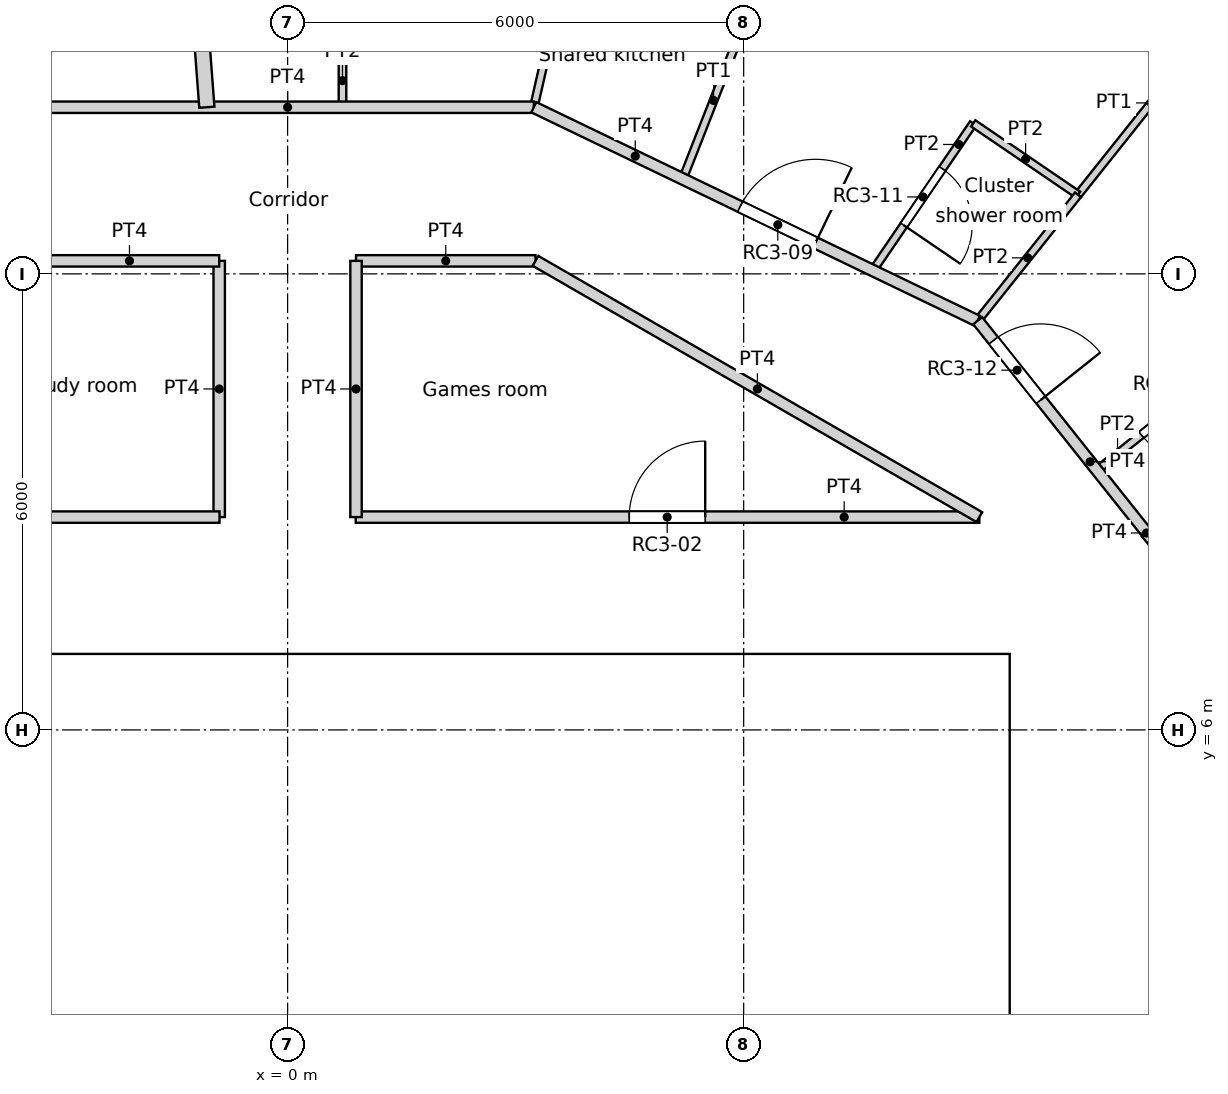
"""IFC4 building model, lengths in metres.
Left out: names, types, materials, properties, quantities, classifications, styles, units other than length and angle.
Written with IfcOpenShell. Run it as: python <this file> out.ifc"""

import sys

from ifc_helpers import new_model, si_unit, direction, frame, frame_2d, origin, origin_2d, place, context, subcontext, project, spatial, rectangle, circle, extrude, element, fill, save


model = new_model("IFC4")
c1 = context("Model", 3, precision=1e-05, world=origin(), true_north=direction((0.0, 1.0)))
c2 = subcontext(c1, "Body", "Model", "MODEL_VIEW")
j1 = project(units=[si_unit("LENGTHUNIT", "METRE"), si_unit("PLANEANGLEUNIT", "RADIAN")], contexts=[c1])
p1 = place(None, origin())
s1 = spatial("IfcSite", under=j1, at=p1, CompositionType="ELEMENT")
p2 = place(p1, origin())
s2 = spatial("IfcBuilding", under=s1, at=p2, CompositionType="ELEMENT")
p3 = place(p2, frame((0.0, 0.0, 252.6)))
s3 = spatial("IfcBuildingStorey", under=s2, at=p3, CompositionType="ELEMENT", Elevation=252.6)
p4 = place(p3, frame((11.735, 14.716, 0.0), z_axis=(0.0, 0.0, 1.0), x_axis=(1.0, 0.0, 0.0)))
e1 = element("IfcColumn", 1, at=p4, inside=s3, PredefinedType="COLUMN", context=c2, shape_type="SweptSolid", body=[
    extrude(circle(Radius=0.55, at=origin_2d()), origin(), (0.0, 0.0, 1.0), 3.6),
])
p5 = place(p3, frame((-9.5, 6.7, 0.0), z_axis=(0.0, 0.0, 1.0), x_axis=(1.0, 0.0, 0.0)))
e2 = element("IfcWall", 2, at=p5, inside=s3, PredefinedType="SOLIDWALL", context=c2, shape_type="SweptSolid", body=[
    extrude(rectangle(XDim=19.0, YDim=0.6, at=frame_2d((9.5, 0.0))), origin(), (0.0, 0.0, 1.0), 3.6),
])
p6 = place(p5, frame((5.35, 0.0, 0.0)))
e3 = element("IfcOpeningElement", 3, at=p6, cuts=e2, PredefinedType="OPENING", context=c2, shape_type="SweptSolid", body=[
    extrude(rectangle(XDim=1.7, YDim=2.1, at=frame_2d((0.85, 1.05))), frame((0.0, 0.3, 0.0), z_axis=(0.0, -1.0, 0.0), x_axis=(1.0, 0.0, 0.0)), (0.0, 0.0, 1.0), 0.6),
])
p7 = place(p3, frame((9.2, -6.4, 0.0), z_axis=(0.0, 0.0, 1.0), x_axis=(0.0, 1.0, 0.0)))
e4 = element("IfcWall", 4, at=p7, inside=s3, PredefinedType="SOLIDWALL", context=c2, shape_type="SweptSolid", body=[
    extrude(rectangle(XDim=12.8, YDim=0.6, at=frame_2d((6.4, 0.0))), origin(), (0.0, 0.0, 1.0), 3.6),
])
p8 = place(p7, frame((6.4, 0.0, 0.0)))
e5 = element("IfcOpeningElement", 5, at=p8, cuts=e4, PredefinedType="OPENING", context=c2, shape_type="SweptSolid", body=[
    extrude(rectangle(XDim=1.8, YDim=2.1, at=frame_2d((0.9, 1.05))), frame((0.0, 0.3, 0.0), z_axis=(0.0, -1.0, 0.0), x_axis=(1.0, 0.0, 0.0)), (0.0, 0.0, 1.0), 0.6),
])
p9 = place(p3, frame((-4.35, 3.1, 0.0), z_axis=(0.0, 0.0, 1.0), x_axis=(1.0, 0.0, 0.0)))
e6 = element("IfcWall", 6, at=p9, inside=s3, PredefinedType="SOLIDWALL", context=c2, shape_type="SweptSolid", body=[
    extrude(rectangle(XDim=13.25, YDim=0.3, at=frame_2d((6.625, 0.0))), origin(), (0.0, 0.0, 1.0), 3.25),
])
p10 = place(p9, frame((2.95, 0.0, 0.0)))
e7 = element("IfcOpeningElement", 7, at=p10, cuts=e6, PredefinedType="OPENING", context=c2, shape_type="SweptSolid", body=[
    extrude(rectangle(XDim=1.1, YDim=2.1, at=frame_2d((0.55, 1.05))), frame((0.0, 0.15, 0.0), z_axis=(0.0, -1.0, 0.0), x_axis=(1.0, 0.0, 0.0)), (0.0, 0.0, 1.0), 0.3),
])
p11 = place(p9, frame((5.75, 0.0, 0.0)))
e8 = element("IfcOpeningElement", 8, at=p11, cuts=e6, PredefinedType="OPENING", context=c2, shape_type="SweptSolid", body=[
    extrude(rectangle(XDim=1.1, YDim=2.1, at=frame_2d((0.55, 1.05))), frame((0.0, 0.15, 0.0), z_axis=(0.0, -1.0, 0.0), x_axis=(1.0, 0.0, 0.0)), (0.0, 0.0, 1.0), 0.3),
])
p12 = place(p9, frame((8.55, 0.0, 0.0)))
e9 = element("IfcOpeningElement", 9, at=p12, cuts=e6, PredefinedType="OPENING", context=c2, shape_type="SweptSolid", body=[
    extrude(rectangle(XDim=1.1, YDim=2.1, at=frame_2d((0.55, 1.05))), frame((0.0, 0.15, 0.0), z_axis=(0.0, -1.0, 0.0), x_axis=(1.0, 0.0, 0.0)), (0.0, 0.0, 1.0), 0.3),
])
p13 = place(p3, frame((-2.25, -2.95, 0.0), z_axis=(0.0, 0.0, 1.0), x_axis=(0.0, 1.0, 0.0)))
e10 = element("IfcWall", 10, at=p13, inside=s3, PredefinedType="SOLIDWALL", context=c2, shape_type="SweptSolid", body=[
    extrude(rectangle(XDim=5.9, YDim=0.15, at=frame_2d((2.95, 0.0))), origin(), (0.0, 0.0, 1.0), 3.25),
])
p14 = place(p13, frame((2.25, 0.0, 0.0)))
e11 = element("IfcOpeningElement", 11, at=p14, cuts=e10, PredefinedType="OPENING", context=c2, shape_type="SweptSolid", body=[
    extrude(rectangle(XDim=1.4, YDim=2.1, at=frame_2d((0.7, 1.05))), frame((0.0, 0.075, 0.0), z_axis=(0.0, -1.0, 0.0), x_axis=(1.0, 0.0, 0.0)), (0.0, 0.0, 1.0), 0.15),
])
for number, where, z_axis, x_axis in (
    (12, (-2.25, 3.25, 0.0), (0.0, 0.0, 1.0), (0.0, 1.0, 0.0)),
    (13, (0.55, 3.25, 0.0), (0.0, 0.0, 1.0), (0.0, 1.0, 0.0)),
    (14, (3.35, 3.25, 0.0), (0.0, 0.0, 1.0), (0.0, 1.0, 0.0)),
    (15, (6.15, 3.25, 0.0), (0.0, 0.0, 1.0), (0.0, 1.0, 0.0)),
):
    element("IfcWall", number, at=place(p3, frame(where, z_axis=z_axis, x_axis=x_axis)), inside=s3, PredefinedType="SOLIDWALL", context=c2, shape_type="SweptSolid", body=[
        extrude(rectangle(XDim=3.15, YDim=0.3, at=frame_2d((1.575, 0.0))), origin(), (0.0, 0.0, 1.0), 3.25),
    ])
p15 = place(p3, frame((-9.092, 8.8, 0.0), z_axis=(0.0, 0.0, 1.0), x_axis=(1.0, 0.0, 0.0)))
e16 = element("IfcWall", 16, at=p15, inside=s3, PredefinedType="PARTITIONING", context=c2, shape_type="SweptSolid", body=[
    extrude(rectangle(XDim=8.196, YDim=0.15, at=frame_2d((4.098, 0.0))), origin(), (0.0, 0.0, 1.0), 3.25),
])
p16 = place(p15, frame((3.598, 0.0, 0.0)))
e17 = element("IfcOpeningElement", 17, at=p16, cuts=e16, PredefinedType="OPENING", context=c2, shape_type="SweptSolid", body=[
    extrude(rectangle(XDim=1.0, YDim=2.04, at=frame_2d((0.5, 1.02))), frame((0.0, 0.075, 0.0), z_axis=(0.0, -1.0, 0.0), x_axis=(1.0, 0.0, 0.0)), (0.0, 0.0, 1.0), 0.15),
])
p17 = place(p3, frame((0.896, 8.8, 0.0), z_axis=(0.0, 0.0, 1.0), x_axis=(1.0, 0.0, 0.0)))
e18 = element("IfcWall", 18, at=p17, inside=s3, PredefinedType="PARTITIONING", context=c2, shape_type="SweptSolid", body=[
    extrude(rectangle(XDim=8.205, YDim=0.15, at=frame_2d((4.102, 0.0))), origin(), (0.0, 0.0, 1.0), 3.25),
])
p18 = place(p17, frame((3.598, 0.0, 0.0)))
e19 = element("IfcOpeningElement", 19, at=p18, cuts=e18, PredefinedType="OPENING", context=c2, shape_type="SweptSolid", body=[
    extrude(rectangle(XDim=1.0, YDim=2.04, at=frame_2d((0.5, 1.02))), frame((0.0, 0.075, 0.0), z_axis=(0.0, -1.0, 0.0), x_axis=(1.0, 0.0, 0.0)), (0.0, 0.0, 1.0), 0.15),
])
p19 = place(p3, frame((9.079, 11.384, 0.0), z_axis=(0.0, 0.0, 1.0), x_axis=(0.623165080354, -0.782090328944, 0.0)))
e20 = element("IfcWall", 20, at=p19, inside=s3, PredefinedType="PARTITIONING", context=c2, shape_type="SweptSolid", body=[
    extrude(rectangle(XDim=3.564, YDim=0.15, at=frame_2d((1.782, 0.0))), origin(), (0.0, 0.0, 1.0), 3.25),
])
p20 = place(p19, frame((0.332, 0.0, 0.0)))
e21 = element("IfcOpeningElement", 21, at=p20, cuts=e20, PredefinedType="OPENING", context=c2, shape_type="SweptSolid", body=[
    extrude(rectangle(XDim=1.0, YDim=2.1, at=frame_2d((0.5, 1.05))), frame((0.0, 0.075, 0.0), z_axis=(0.0, -1.0, 0.0), x_axis=(1.0, 0.0, 0.0)), (0.0, 0.0, 1.0), 0.15),
])
p21 = place(p3, frame((11.3, 8.586, 0.0), z_axis=(0.0, 0.0, 1.0), x_axis=(0.0, 1.0, 0.0)))
e22 = element("IfcWall", 22, at=p21, inside=s3, PredefinedType="PARTITIONING", context=c2, shape_type="SweptSolid", body=[
    extrude(rectangle(XDim=0.01, YDim=0.15, at=frame_2d((0.005, 0.0))), origin(), (0.0, 0.0, 1.0), 3.25),
])
p22 = place(p3, frame((11.3, 8.592, 0.0), z_axis=(0.0, 0.0, 1.0), x_axis=(0.623405636383, -0.781898594785, 0.0)))
e23 = element("IfcWall", 23, at=p22, inside=s3, PredefinedType="PARTITIONING", context=c2, shape_type="SweptSolid", body=[
    extrude(rectangle(XDim=0.74, YDim=0.15, at=frame_2d((0.37, 0.0))), origin(), (0.0, 0.0, 1.0), 3.25),
])
p23 = place(p3, frame((-0.9, 8.8, 0.0), z_axis=(0.0, 0.0, 1.0), x_axis=(0.0, 1.0, 0.0)))
e24 = element("IfcWall", 24, at=p23, inside=s3, PredefinedType="PARTITIONING", context=c2, shape_type="SweptSolid", body=[
    extrude(rectangle(XDim=3.371, YDim=0.15, at=frame_2d((1.686, 0.0))), origin(), (0.0, 0.0, 1.0), 3.25),
])
p24 = place(p3, frame((-3.261, 12.171, 0.0), z_axis=(0.0, 0.0, 1.0), x_axis=(1.0, 0.0, 0.0)))
e25 = element("IfcWall", 25, at=p24, inside=s3, PredefinedType="PARTITIONING", context=c2, shape_type="SweptSolid", body=[
    extrude(rectangle(XDim=2.361, YDim=0.15, at=frame_2d((1.181, 0.0))), origin(), (0.0, 0.0, 1.0), 3.25),
])
p25 = place(p3, frame((3.261, 12.171, 0.0), z_axis=(0.0, 0.0, 1.0), x_axis=(0.866066809554, -0.499928276245, 0.0)))
e26 = element("IfcWall", 26, at=p25, inside=s3, PredefinedType="PARTITIONING", context=c2, shape_type="SweptSolid", body=[
    extrude(rectangle(XDim=6.743, YDim=0.15, at=frame_2d((3.371, 0.0))), origin(), (0.0, 0.0, 1.0), 3.25),
])
p26 = place(p3, frame((0.9, 12.171, 0.0), z_axis=(0.0, 0.0, 1.0), x_axis=(1.0, 0.0, 0.0)))
e27 = element("IfcWall", 27, at=p26, inside=s3, PredefinedType="PARTITIONING", context=c2, shape_type="SweptSolid", body=[
    extrude(rectangle(XDim=2.361, YDim=0.15, at=frame_2d((1.181, 0.0))), origin(), (0.0, 0.0, 1.0), 3.25),
])
p27 = place(p3, frame((0.9, 8.8, 0.0), z_axis=(0.0, 0.0, 1.0), x_axis=(0.0, 1.0, 0.0)))
e28 = element("IfcWall", 28, at=p27, inside=s3, PredefinedType="PARTITIONING", context=c2, shape_type="SweptSolid", body=[
    extrude(rectangle(XDim=3.371, YDim=0.15, at=frame_2d((1.686, 0.0))), origin(), (0.0, 0.0, 1.0), 3.25),
])
p28 = place(p3, frame((3.239, 14.192, 0.0), z_axis=(0.0, 0.0, 1.0), x_axis=(0.90093183072, -0.433960639224, 0.0)))
e29 = element("IfcWall", 29, at=p28, inside=s3, PredefinedType="PARTITIONING", context=c2, shape_type="SweptSolid", body=[
    extrude(rectangle(XDim=6.479, YDim=0.15, at=frame_2d((3.239, 0.0))), origin(), (0.0, 0.0, 1.0), 3.25),
])
p29 = place(p28, frame((3.013, 0.0, 0.0)))
e30 = element("IfcOpeningElement", 30, at=p29, cuts=e29, PredefinedType="OPENING", context=c2, shape_type="SweptSolid", body=[
    extrude(rectangle(XDim=1.1, YDim=2.1, at=frame_2d((0.55, 1.05))), frame((0.0, 0.075, 0.0), z_axis=(0.0, -1.0, 0.0), x_axis=(1.0, 0.0, 0.0)), (0.0, 0.0, 1.0), 0.15),
])
p30 = place(p3, frame((-3.239, 14.192, 0.0), z_axis=(0.0, 0.0, 1.0), x_axis=(1.0, 0.0, 0.0)))
e31 = element("IfcWall", 31, at=p30, inside=s3, PredefinedType="PARTITIONING", context=c2, shape_type="SweptSolid", body=[
    extrude(rectangle(XDim=6.478, YDim=0.15, at=frame_2d((3.239, 0.0))), origin(), (0.0, 0.0, 1.0), 3.25),
])
p31 = place(p3, frame((5.199, 13.248, 0.0), z_axis=(0.0, 0.0, 1.0), x_axis=(0.365334662456, 0.930876245485, 0.0)))
e32 = element("IfcWall", 32, at=p31, inside=s3, PredefinedType="PARTITIONING", context=c2, shape_type="SweptSolid", body=[
    extrude(rectangle(XDim=5.54, YDim=0.1, at=frame_2d((2.77, 0.0))), origin(), (0.0, 0.0, 1.0), 3.25),
])
p32 = place(p31, frame((2.27, 0.0, 0.0)))
e33 = element("IfcOpeningElement", 33, at=p32, cuts=e32, PredefinedType="OPENING", context=c2, shape_type="SweptSolid", body=[
    extrude(rectangle(XDim=1.0, YDim=2.04, at=frame_2d((0.5, 1.02))), frame((0.0, 0.05, 0.0), z_axis=(0.0, -1.0, 0.0), x_axis=(1.0, 0.0, 0.0)), (0.0, 0.0, 1.0), 0.1),
])
p33 = place(p3, frame((9.02, 13.98, 0.0), z_axis=(0.0, 0.0, 1.0), x_axis=(0.826289240924, -0.563246030021, 0.0)))
e34 = element("IfcWall", 34, at=p33, inside=s3, PredefinedType="PARTITIONING", context=c2, shape_type="SweptSolid", body=[
    extrude(rectangle(XDim=1.669, YDim=0.1, at=frame_2d((0.834, 0.0))), origin(), (0.0, 0.0, 1.0), 3.25),
])
p34 = place(p3, frame((7.7, 12.044, 0.0), z_axis=(0.0, 0.0, 1.0), x_axis=(0.563349756349, 0.826218525586, 0.0)))
e35 = element("IfcWall", 35, at=p34, inside=s3, PredefinedType="PARTITIONING", context=c2, shape_type="SweptSolid", body=[
    extrude(rectangle(XDim=2.343, YDim=0.1, at=frame_2d((1.172, 0.0))), origin(), (0.0, 0.0, 1.0), 3.25),
])
p35 = place(p34, frame((0.721, 0.0, 0.0)))
e36 = element("IfcOpeningElement", 36, at=p35, cuts=e35, PredefinedType="OPENING", context=c2, shape_type="SweptSolid", body=[
    extrude(rectangle(XDim=0.9, YDim=2.0, at=frame_2d((0.45, 1.0))), frame((0.0, 0.05, 0.0), z_axis=(0.0, -1.0, 0.0), x_axis=(1.0, 0.0, 0.0)), (0.0, 0.0, 1.0), 0.1),
])
p36 = place(p3, frame((10.399, 13.04, 0.0), z_axis=(0.0, 0.0, 1.0), x_axis=(0.62343302941, 0.781876753613, 0.0)))
e37 = element("IfcWall", 37, at=p36, inside=s3, PredefinedType="PARTITIONING", context=c2, shape_type="SweptSolid", body=[
    extrude(rectangle(XDim=3.093, YDim=0.1, at=frame_2d((1.546, 0.0))), origin(), (0.0, 0.0, 1.0), 3.25),
])
p37 = place(p3, frame((3.239, 14.192, 0.0), z_axis=(0.0, 0.0, 1.0), x_axis=(0.222612505682, 0.974907007008, 0.0)))
e38 = element("IfcWall", 38, at=p37, inside=s3, PredefinedType="PARTITIONING", context=c2, shape_type="SweptSolid", body=[
    extrude(rectangle(XDim=5.215, YDim=0.1, at=frame_2d((2.607, 0.0))), origin(), (0.0, 0.0, 1.0), 3.25),
])
p38 = place(p37, frame((2.353, 0.0, 0.0)))
e39 = element("IfcOpeningElement", 39, at=p38, cuts=e38, PredefinedType="OPENING", context=c2, shape_type="SweptSolid", body=[
    extrude(rectangle(XDim=0.9, YDim=2.1, at=frame_2d((0.45, 1.05))), frame((0.0, 0.05, 0.0), z_axis=(0.0, -1.0, 0.0), x_axis=(1.0, 0.0, 0.0)), (0.0, 0.0, 1.0), 0.1),
])
p39 = place(p3, frame((9.076, 11.381, 0.0), z_axis=(0.0, 0.0, 1.0), x_axis=(0.623501640025, 0.781822041699, 0.0)))
e40 = element("IfcWall", 40, at=p39, inside=s3, PredefinedType="PARTITIONING", context=c2, shape_type="SweptSolid", body=[
    extrude(rectangle(XDim=2.122, YDim=0.1, at=frame_2d((1.061, 0.0))), origin(), (0.0, 0.0, 1.0), 3.25),
])
p40 = place(p3, frame((10.645, 9.413, 0.0), z_axis=(0.0, 0.0, 1.0), x_axis=(0.781830263661, 0.623491330191, 0.0)))
e41 = element("IfcWall", 41, at=p40, inside=s3, PredefinedType="PARTITIONING", context=c2, shape_type="SweptSolid", body=[
    extrude(rectangle(XDim=2.401, YDim=0.1, at=frame_2d((1.2, 0.0))), origin(), (0.0, 0.0, 1.0), 3.25),
])
p41 = place(p40, frame((0.751, 0.0, 0.0)))
e42 = element("IfcOpeningElement", 42, at=p41, cuts=e41, PredefinedType="OPENING", context=c2, shape_type="SweptSolid", body=[
    extrude(rectangle(XDim=0.9, YDim=2.04, at=frame_2d((0.45, 1.02))), frame((0.0, 0.05, 0.0), z_axis=(0.0, -1.0, 0.0), x_axis=(1.0, 0.0, 0.0)), (0.0, 0.0, 1.0), 0.1),
])
p42 = place(p3, frame((0.722, 14.192, 0.0), z_axis=(0.0, 0.0, 1.0), x_axis=(0.0, 1.0, 0.0)))
e43 = element("IfcWall", 43, at=p42, inside=s3, PredefinedType="PARTITIONING", context=c2, shape_type="SweptSolid", body=[
    extrude(rectangle(XDim=2.4, YDim=0.1, at=frame_2d((1.2, 0.0))), origin(), (0.0, 0.0, 1.0), 3.25),
])
p43 = place(p42, frame((0.75, 0.0, 0.0)))
e44 = element("IfcOpeningElement", 44, at=p43, cuts=e43, PredefinedType="OPENING", context=c2, shape_type="SweptSolid", body=[
    extrude(rectangle(XDim=0.9, YDim=2.04, at=frame_2d((0.45, 1.02))), frame((0.0, 0.05, 0.0), z_axis=(0.0, -1.0, 0.0), x_axis=(1.0, 0.0, 0.0)), (0.0, 0.0, 1.0), 0.1),
])
p44 = place(p3, frame((-1.478, 19.716, 0.0), z_axis=(0.0, 0.0, 1.0), x_axis=(0.075011267216, -0.997182686267, 0.0)))
e45 = element("IfcWall", 45, at=p44, inside=s3, PredefinedType="PARTITIONING", context=c2, shape_type="SweptSolid", body=[
    extrude(rectangle(XDim=5.54, YDim=0.2, at=frame_2d((2.77, 0.0))), origin(), (0.0, 0.0, 1.0), 3.25),
])
p45 = place(p6, origin())
e46 = element("IfcDoor", 46, at=p45, inside=s3, OperationType="DOUBLE_DOOR_SINGLE_SWING", PredefinedType="DOOR", context=c2, shape_type="SweptSolid", body=[
    extrude(rectangle(XDim=1.7, YDim=2.1, at=frame_2d((0.85, 1.05))), frame((0.0, 0.025, 0.0), z_axis=(0.0, -1.0, 0.0), x_axis=(1.0, 0.0, 0.0)), (0.0, 0.0, 1.0), 0.05),
])
fill(e3, e46)
p46 = place(p10, origin())
e47 = element("IfcDoor", 47, at=p46, inside=s3, OperationType="SLIDING_TO_LEFT", PredefinedType="DOOR", context=c2, shape_type="SweptSolid", body=[
    extrude(rectangle(XDim=1.1, YDim=2.1, at=frame_2d((0.55, 1.05))), frame((0.0, 0.025, 0.0), z_axis=(0.0, -1.0, 0.0), x_axis=(1.0, 0.0, 0.0)), (0.0, 0.0, 1.0), 0.05),
])
fill(e7, e47)
p47 = place(p11, origin())
e48 = element("IfcDoor", 48, at=p47, inside=s3, OperationType="SLIDING_TO_RIGHT", PredefinedType="DOOR", context=c2, shape_type="SweptSolid", body=[
    extrude(rectangle(XDim=1.1, YDim=2.1, at=frame_2d((0.55, 1.05))), frame((0.0, 0.025, 0.0), z_axis=(0.0, -1.0, 0.0), x_axis=(1.0, 0.0, 0.0)), (0.0, 0.0, 1.0), 0.05),
])
fill(e8, e48)
p48 = place(p12, origin())
e49 = element("IfcDoor", 49, at=p48, inside=s3, OperationType="SLIDING_TO_LEFT", PredefinedType="DOOR", context=c2, shape_type="SweptSolid", body=[
    extrude(rectangle(XDim=1.1, YDim=2.1, at=frame_2d((0.55, 1.05))), frame((0.0, 0.025, 0.0), z_axis=(0.0, -1.0, 0.0), x_axis=(1.0, 0.0, 0.0)), (0.0, 0.0, 1.0), 0.05),
])
fill(e9, e49)
p49 = place(p18, origin())
e50 = element("IfcDoor", 50, at=p49, inside=s3, OperationType="SINGLE_SWING_RIGHT", PredefinedType="DOOR", context=c2, shape_type="SweptSolid", body=[
    extrude(rectangle(XDim=1.0, YDim=2.04, at=frame_2d((0.5, 1.02))), frame((0.0, 0.025, 0.0), z_axis=(0.0, -1.0, 0.0), x_axis=(1.0, 0.0, 0.0)), (0.0, 0.0, 1.0), 0.05),
])
fill(e19, e50)
p50 = place(p29, origin())
e51 = element("IfcDoor", 51, at=p50, inside=s3, OperationType="SINGLE_SWING_RIGHT", PredefinedType="DOOR", context=c2, shape_type="SweptSolid", body=[
    extrude(rectangle(XDim=1.1, YDim=2.1, at=frame_2d((0.55, 1.05))), frame((0.0, 0.025, 0.0), z_axis=(0.0, -1.0, 0.0), x_axis=(1.0, 0.0, 0.0)), (0.0, 0.0, 1.0), 0.05),
])
fill(e30, e51)
p51 = place(p35, origin())
e52 = element("IfcDoor", 52, at=p51, inside=s3, OperationType="SINGLE_SWING_RIGHT", PredefinedType="DOOR", context=c2, shape_type="SweptSolid", body=[
    extrude(rectangle(XDim=0.9, YDim=2.0, at=frame_2d((0.45, 1.0))), frame((0.0, 0.025, 0.0), z_axis=(0.0, -1.0, 0.0), x_axis=(1.0, 0.0, 0.0)), (0.0, 0.0, 1.0), 0.05),
])
fill(e36, e52)
p52 = place(p20, origin())
e53 = element("IfcDoor", 53, at=p52, inside=s3, OperationType="SINGLE_SWING_RIGHT", PredefinedType="DOOR", context=c2, shape_type="SweptSolid", body=[
    extrude(rectangle(XDim=1.0, YDim=2.1, at=frame_2d((0.5, 1.05))), frame((0.0, 0.025, 0.0), z_axis=(0.0, -1.0, 0.0), x_axis=(1.0, 0.0, 0.0)), (0.0, 0.0, 1.0), 0.05),
])
fill(e21, e53)
p53 = place(p41, origin())
e54 = element("IfcDoor", 54, at=p53, inside=s3, OperationType="SINGLE_SWING_LEFT", PredefinedType="DOOR", context=c2, shape_type="SweptSolid", body=[
    extrude(rectangle(XDim=0.9, YDim=2.04, at=frame_2d((0.45, 1.02))), frame((0.0, 0.025, 0.0), z_axis=(0.0, -1.0, 0.0), x_axis=(1.0, 0.0, 0.0)), (0.0, 0.0, 1.0), 0.05),
])
fill(e42, e54)
save(model, sys.argv[1])
